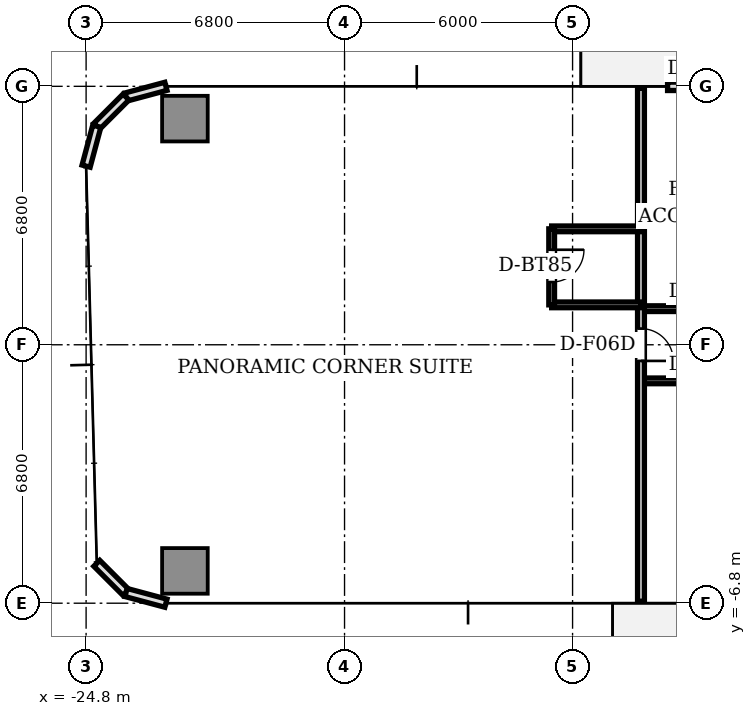
"""IFC4 building model, lengths in metres.
Left out: names, types, materials, properties, quantities, classifications, styles, units other than length and angle.
Written with IfcOpenShell. Run it as: python <this file> out.ifc"""

import sys

from ifc_helpers import new_model, si_unit, direction, frame, frame_2d, origin, origin_2d, place, context, subcontext, project, spatial, rectangle, extrude, source, transform, mapped, element, fill, save


model = new_model("IFC4")
c1 = context("Model", 3, precision=1e-05, world=origin(), true_north=direction((0.0, 1.0)))
c2 = subcontext(c1, "Body", "Model", "MODEL_VIEW")
j1 = project(units=[si_unit("LENGTHUNIT", "METRE"), si_unit("PLANEANGLEUNIT", "RADIAN")], contexts=[c1])
p1 = place(None, origin())
s1 = spatial("IfcSite", under=j1, at=p1, CompositionType="ELEMENT")
p2 = place(p1, origin())
s2 = spatial("IfcBuilding", under=s1, at=p2, CompositionType="ELEMENT")
p3 = place(p2, frame((0.0, 0.0, 71.15)))
s3 = spatial("IfcBuildingStorey", under=s2, at=p3, CompositionType="ELEMENT", Elevation=71.15)
m1 = source(origin(), c2, "Body", "SweptSolid", [
    extrude(rectangle(XDim=1.2, YDim=1.2, at=origin_2d()), origin(), (0.0, 0.0, 1.0), 3.03),
])
for number, where, z_axis, x_axis in (
    (1, (-22.2, 5.95, 0.0), (0.0, 0.0, 1.0), (1.0, 0.0, 0.0)),
    (2, (-22.2, -5.95, 0.0), (0.0, 0.0, 1.0), (1.0, 0.0, 0.0)),
):
    element("IfcColumn", number, at=place(p3, frame(where, z_axis=z_axis, x_axis=x_axis)), inside=s3, PredefinedType="COLUMN", context=c2, shape_type="MappedRepresentation", body=[
        mapped(m1, transform((0.0, 0.0, 0.0), scale=1.0)),
    ])
p4 = place(p3, frame((-6.8, 6.8, 0.0), z_axis=(0.0, 0.0, 1.0), x_axis=(-1.0, 0.0, 0.0)))
e3 = element("IfcWall", 3, at=p4, inside=s3, PredefinedType="STANDARD", context=c2, shape_type="SweptSolid", body=[
    extrude(rectangle(XDim=2.7, YDim=0.22, at=frame_2d((1.35, 0.0))), origin(), (0.0, 0.0, 1.0), 3.03),
])
p5 = place(p4, frame((1.4, 0.0, 0.0)))
e4 = element("IfcOpeningElement", 4, at=p5, cuts=e3, PredefinedType="OPENING", context=c2, shape_type="SweptSolid", body=[
    extrude(rectangle(XDim=1.0, YDim=2.2, at=frame_2d((0.5, 1.1))), frame((0.0, 0.12, 0.0), z_axis=(0.0, -1.0, 0.0), x_axis=(1.0, 0.0, 0.0)), (0.0, 0.0, 1.0), 0.24),
])
for number, where, z_axis, x_axis in (
    (5, (-22.7, 6.8, 0.0), (0.0, 0.0, 1.0), (-0.966, -0.259, 0.0)),
    (6, (-23.75, 6.519, 0.0), (0.0, 0.0, 1.0), (-0.707, -0.707, 0.0)),
    (7, (-24.519, 5.75, 0.0), (0.0, 0.0, 1.0), (-0.259, -0.966, 0.0)),
    (8, (-24.519, -5.75, 0.0), (0.0, 0.0, 1.0), (0.707, -0.707, 0.0)),
    (9, (-23.75, -6.519, 0.0), (0.0, 0.0, 1.0), (0.966, -0.259, 0.0)),
):
    element("IfcWall", number, at=place(p3, frame(where, z_axis=z_axis, x_axis=x_axis)), inside=s3, PredefinedType="STANDARD", context=c2, shape_type="SweptSolid", body=[
        extrude(rectangle(XDim=1.087, YDim=0.22, at=frame_2d((0.543, 0.0))), origin(), (0.0, 0.0, 1.0), 3.03),
    ])
p6 = place(p3, frame((-6.85, -0.95, 0.0), z_axis=(0.0, 0.0, 1.0), x_axis=(-1.0, 0.0, 0.0)))
e10 = element("IfcWall", 10, at=p6, inside=s3, PredefinedType="PARTITIONING", context=c2, shape_type="SweptSolid", body=[
    extrude(rectangle(XDim=3.35, YDim=0.15, at=frame_2d((1.675, 0.0))), origin(), (0.0, 0.0, 1.0), 2.58),
])
p7 = place(p6, frame((1.2, 0.0, 0.0)))
e11 = element("IfcOpeningElement", 11, at=p7, cuts=e10, PredefinedType="OPENING", context=c2, shape_type="SweptSolid", body=[
    extrude(rectangle(XDim=0.85, YDim=2.1, at=frame_2d((0.425, 1.05))), frame((0.0, 0.085, 0.0), z_axis=(0.0, -1.0, 0.0), x_axis=(1.0, 0.0, 0.0)), (0.0, 0.0, 1.0), 0.17),
])
p8 = place(p3, frame((-6.85, 0.95, 0.0), z_axis=(0.0, 0.0, 1.0), x_axis=(-1.0, 0.0, 0.0)))
e12 = element("IfcWall", 12, at=p8, inside=s3, PredefinedType="PARTITIONING", context=c2, shape_type="SweptSolid", body=[
    extrude(rectangle(XDim=3.35, YDim=0.15, at=frame_2d((1.675, 0.0))), origin(), (0.0, 0.0, 1.0), 2.58),
])
p9 = place(p8, frame((1.2, 0.0, 0.0)))
e13 = element("IfcOpeningElement", 13, at=p9, cuts=e12, PredefinedType="OPENING", context=c2, shape_type="SweptSolid", body=[
    extrude(rectangle(XDim=0.85, YDim=2.1, at=frame_2d((0.425, 1.05))), frame((0.0, 0.085, 0.0), z_axis=(0.0, -1.0, 0.0), x_axis=(1.0, 0.0, 0.0)), (0.0, 0.0, 1.0), 0.17),
])
p10 = place(p3, frame((-10.2, 6.75, 0.0), z_axis=(0.0, 0.0, 1.0), x_axis=(0.0, -1.0, 0.0)))
e14 = element("IfcWall", 14, at=p10, inside=s3, PredefinedType="PARTITIONING", context=c2, shape_type="SweptSolid", body=[
    extrude(rectangle(XDim=13.5, YDim=0.18, at=frame_2d((6.75, 0.0))), origin(), (0.0, 0.0, 1.0), 2.58),
])
p11 = place(p10, frame((6.325, 0.0, 0.0)))
e15 = element("IfcOpeningElement", 15, at=p11, cuts=e14, PredefinedType="OPENING", context=c2, shape_type="SweptSolid", body=[
    extrude(rectangle(XDim=0.85, YDim=2.1, at=frame_2d((0.425, 1.05))), frame((0.0, 0.1, 0.0), z_axis=(0.0, -1.0, 0.0), x_axis=(1.0, 0.0, 0.0)), (0.0, 0.0, 1.0), 0.2),
])
p12 = place(p3, frame((-10.2, 1.05, 0.0), z_axis=(0.0, 0.0, 1.0), x_axis=(-1.0, 0.0, 0.0)))
e16 = element("IfcWall", 16, at=p12, inside=s3, PredefinedType="PARTITIONING", context=c2, shape_type="SweptSolid", body=[
    extrude(rectangle(XDim=2.35, YDim=0.15, at=frame_2d((1.175, 0.0))), origin(), (0.0, 0.0, 1.0), 2.58),
])
p13 = place(p3, frame((-10.2, 3.05, 0.0), z_axis=(0.0, 0.0, 1.0), x_axis=(-1.0, 0.0, 0.0)))
e17 = element("IfcWall", 17, at=p13, inside=s3, PredefinedType="PARTITIONING", context=c2, shape_type="SweptSolid", body=[
    extrude(rectangle(XDim=2.35, YDim=0.15, at=frame_2d((1.175, 0.0))), origin(), (0.0, 0.0, 1.0), 2.55),
])
p14 = place(p3, frame((-12.55, 3.05, 0.0), z_axis=(0.0, 0.0, 1.0), x_axis=(0.0, -1.0, 0.0)))
e18 = element("IfcWall", 18, at=p14, inside=s3, PredefinedType="PARTITIONING", context=c2, shape_type="SweptSolid", body=[
    extrude(rectangle(XDim=2.0, YDim=0.15, at=frame_2d((1.0, 0.0))), origin(), (0.0, 0.0, 1.0), 2.58),
])
p15 = place(p14, frame((0.55, 0.0, 0.0)))
e19 = element("IfcOpeningElement", 19, at=p15, cuts=e18, PredefinedType="OPENING", context=c2, shape_type="SweptSolid", body=[
    extrude(rectangle(XDim=0.85, YDim=2.1, at=frame_2d((0.425, 1.05))), frame((0.0, 0.085, 0.0), z_axis=(0.0, -1.0, 0.0), x_axis=(1.0, 0.0, 0.0)), (0.0, 0.0, 1.0), 0.17),
])
m2 = source(origin(), c2, "Body", "SweptSolid", [
    extrude(rectangle(XDim=0.85, YDim=0.05, at=origin_2d()), origin(), (0.0, 0.0, 1.0), 2.1),
])
p16 = place(p15, frame((0.425, 0.0, 0.0)))
e20 = element("IfcDoor", 20, at=p16, inside=s3, OperationType="SINGLE_SWING_LEFT", PredefinedType="DOOR", context=c2, shape_type="MappedRepresentation", body=[
    mapped(m2, transform((0.0, 0.0, 0.0), scale=1.0)),
])
fill(e19, e20)
p17 = place(p11, frame((0.425, 0.0, 0.0)))
e21 = element("IfcDoor", 21, at=p17, inside=s3, OperationType="SINGLE_SWING_RIGHT", PredefinedType="DOOR", context=c2, shape_type="MappedRepresentation", body=[
    mapped(m2, transform((0.0, 0.0, 0.0), scale=1.0)),
])
fill(e15, e21)
save(model, sys.argv[1])
